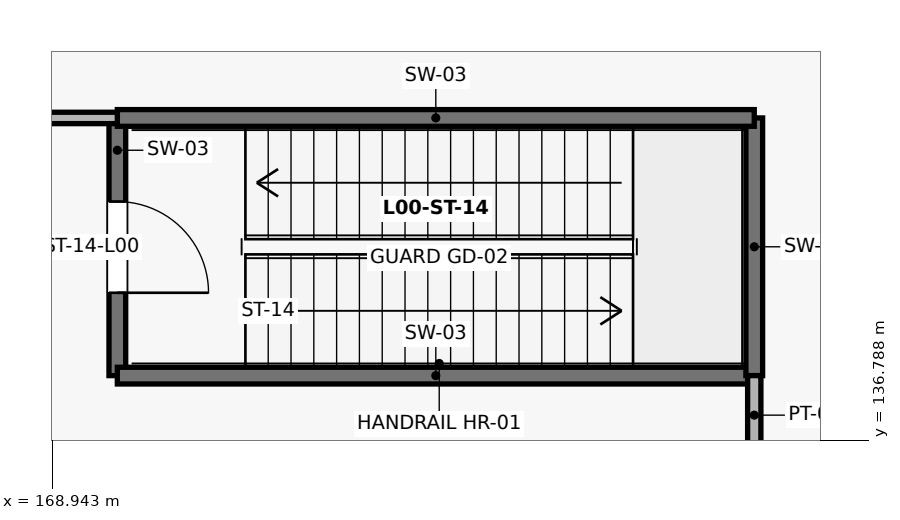
"""IFC4 building model, lengths in metres.
Left out: names, types, materials, properties, quantities, classifications, styles, units other than length and angle.
Written with IfcOpenShell. Run it as: python <this file> out.ifc"""

import sys

from ifc_helpers import new_model, si_unit, direction, frame, frame_2d, origin, place, context, subcontext, project, spatial, rectangle, extrude, element, fill, save


model = new_model("IFC4")
c1 = context("Model", 3, precision=1e-05, world=origin(), true_north=direction((0.0, 1.0)))
c2 = subcontext(c1, "Body", "Model", "MODEL_VIEW")
j1 = project(units=[si_unit("LENGTHUNIT", "METRE"), si_unit("PLANEANGLEUNIT", "RADIAN")], contexts=[c1])
p1 = place(None, origin())
s1 = spatial("IfcSite", under=j1, at=p1, CompositionType="ELEMENT")
p2 = place(p1, origin())
s2 = spatial("IfcBuilding", under=s1, at=p2, CompositionType="ELEMENT")
p3 = place(p2, origin())
s3 = spatial("IfcBuildingStorey", under=s2, at=p3, CompositionType="ELEMENT", Elevation=0.0)
p4 = place(p3, frame((169.8, 141.03, 0.0), z_axis=(0.0, 0.0, 1.0), x_axis=(0.0, -1.0, 0.0)))
e1 = element("IfcWall", 1, at=p4, inside=s3, PredefinedType="SHEAR", context=c2, shape_type="SweptSolid", body=[
    extrude(rectangle(XDim=3.39, YDim=0.22, at=frame_2d((1.695, 0.0))), origin(), (0.0, 0.0, 1.0), 6.26),
])
p5 = place(p4, frame((1.1, 0.0, 0.0)))
e2 = element("IfcOpeningElement", 2, at=p5, cuts=e1, PredefinedType="OPENING", context=c2, shape_type="SweptSolid", body=[
    extrude(rectangle(XDim=1.2, YDim=2.2, at=frame_2d((0.6, 1.1))), frame((0.0, 0.125, 0.0), z_axis=(0.0, -1.0, 0.0), x_axis=(1.0, 0.0, 0.0)), (0.0, 0.0, 1.0), 0.25),
])
p6 = place(p3, frame((169.8, 137.64, 0.0), z_axis=(0.0, 0.0, 1.0), x_axis=(1.0, 0.0, 0.0)))
e3 = element("IfcWall", 3, at=p6, inside=s3, PredefinedType="SHEAR", context=c2, shape_type="SweptSolid", body=[
    extrude(rectangle(XDim=8.38, YDim=0.22, at=frame_2d((4.19, 0.0))), origin(), (0.0, 0.0, 1.0), 6.26),
])
p7 = place(p3, frame((178.18, 137.64, 0.0), z_axis=(0.0, 0.0, 1.0), x_axis=(0.0, 1.0, 0.0)))
e4 = element("IfcWall", 4, at=p7, inside=s3, PredefinedType="SHEAR", context=c2, shape_type="SweptSolid", body=[
    extrude(rectangle(XDim=3.39, YDim=0.22, at=frame_2d((1.695, 0.0))), origin(), (0.0, 0.0, 1.0), 6.26),
])
p8 = place(p3, frame((178.18, 141.03, 0.0), z_axis=(0.0, 0.0, 1.0), x_axis=(-1.0, 0.0, 0.0)))
e5 = element("IfcWall", 5, at=p8, inside=s3, PredefinedType="SHEAR", context=c2, shape_type="SweptSolid", body=[
    extrude(rectangle(XDim=8.38, YDim=0.22, at=frame_2d((4.19, 0.0))), origin(), (0.0, 0.0, 1.0), 6.26),
])
p9 = place(p3, frame((166.4, 141.03, 0.0), z_axis=(0.0, 0.0, 1.0), x_axis=(1.0, 0.0, 0.0)))
e6 = element("IfcWall", 6, at=p9, inside=s3, PredefinedType="PARTITIONING", context=c2, shape_type="SweptSolid", body=[
    extrude(rectangle(XDim=3.4, YDim=0.15, at=frame_2d((1.7, 0.0))), origin(), (0.0, 0.0, 1.0), 5.843),
])
p10 = place(p3, frame((178.18, 136.6, 0.0), z_axis=(0.0, 0.0, 1.0), x_axis=(0.0, 1.0, 0.0)))
e7 = element("IfcWall", 7, at=p10, inside=s3, PredefinedType="PARTITIONING", context=c2, shape_type="SweptSolid", body=[
    extrude(rectangle(XDim=1.04, YDim=0.175, at=frame_2d((0.52, 0.0))), origin(), (0.0, 0.0, 1.0), 6.25),
])
p11 = place(p5, origin())
e8 = element("IfcDoor", 8, at=p11, inside=s3, OperationType="SINGLE_SWING_RIGHT", PredefinedType="DOOR", context=c2, shape_type="SweptSolid", body=[
    extrude(rectangle(XDim=1.2, YDim=2.2, at=frame_2d((0.6, 1.1))), frame((0.0, 0.025, 0.0), z_axis=(0.0, -1.0, 0.0), x_axis=(1.0, 0.0, 0.0)), (0.0, 0.0, 1.0), 0.05),
])
fill(e2, e8)
save(model, sys.argv[1])
